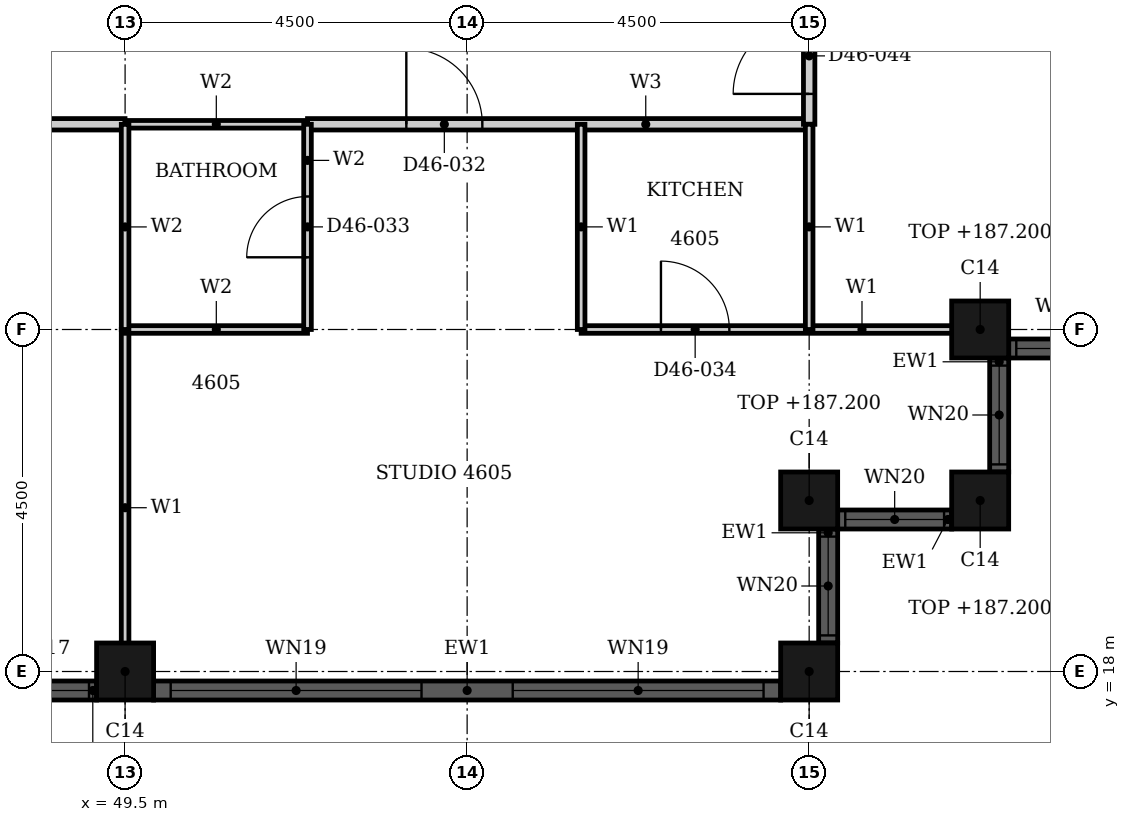
"""IFC4 building model, lengths in metres.
Left out: names, types, materials, properties, quantities, classifications, styles, units other than length and angle.
Written with IfcOpenShell. Run it as: python <this file> out.ifc"""

import sys

from ifc_helpers import new_model, si_unit, direction, frame, frame_2d, origin, origin_2d, place, context, subcontext, project, spatial, rectangle, hollow_rectangle, extrude, element, fill, save


model = new_model("IFC4")
c1 = context("Model", 3, precision=1e-05, world=origin(), true_north=direction((0.0, 1.0)))
c2 = subcontext(c1, "Body", "Model", "MODEL_VIEW")
j1 = project(units=[si_unit("LENGTHUNIT", "METRE"), si_unit("PLANEANGLEUNIT", "RADIAN")], contexts=[c1])
p1 = place(None, origin())
s1 = spatial("IfcSite", under=j1, at=p1, CompositionType="ELEMENT")
p2 = place(p1, origin())
s2 = spatial("IfcBuilding", under=s1, at=p2, CompositionType="ELEMENT")
p3 = place(p2, frame((0.0, 0.0, 183.9)))
s3 = spatial("IfcBuildingStorey", under=s2, at=p3, CompositionType="ELEMENT", Elevation=183.9)
p4 = place(p3, frame((49.5, 18.0, 0.0), z_axis=(0.0, 0.0, 1.0), x_axis=(1.0, 0.0, 0.0)))
e1 = element("IfcColumn", 1, at=p4, inside=s3, PredefinedType="COLUMN", context=c2, shape_type="SweptSolid", body=[
    extrude(hollow_rectangle(XDim=0.75, YDim=0.75, WallThickness=0.024, at=origin_2d()), origin(), (0.0, 0.0, 1.0), 3.7),
])
for number, where, z_axis, x_axis in (
    (2, (58.5, 18.0, 0.0), (0.0, 0.0, 1.0), (1.0, 0.0, 0.0)),
    (3, (58.5, 20.25, 0.0), (0.0, 0.0, 1.0), (1.0, 0.0, 0.0)),
    (4, (60.75, 20.25, 0.0), (0.0, 0.0, 1.0), (1.0, 0.0, 0.0)),
    (5, (60.75, 22.5, 0.0), (0.0, 0.0, 1.0), (1.0, 0.0, 0.0)),
):
    element("IfcColumn", number, at=place(p3, frame(where, z_axis=z_axis, x_axis=x_axis)), inside=s3, PredefinedType="COLUMN", context=c2, shape_type="SweptSolid", body=[
        extrude(hollow_rectangle(XDim=0.75, YDim=0.75, WallThickness=0.024, at=origin_2d()), origin(), (0.0, 0.0, 1.0), 3.3),
    ])
p5 = place(p3, frame((47.625, 17.75, 0.0), z_axis=(0.0, 0.0, 1.0), x_axis=(1.0, 0.0, 0.0)))
e6 = element("IfcWall", 6, at=p5, inside=s3, PredefinedType="SOLIDWALL", context=c2, shape_type="SweptSolid", body=[
    extrude(rectangle(XDim=1.5, YDim=0.25, at=frame_2d((0.75, 0.0))), origin(), (0.0, 0.0, 1.0), 3.7),
])
p6 = place(p5, frame((0.1, 0.0, 0.9)))
e7 = element("IfcOpeningElement", 7, at=p6, cuts=e6, PredefinedType="OPENING", context=c2, shape_type="SweptSolid", body=[
    extrude(rectangle(XDim=1.3, YDim=1.95, at=frame_2d((0.65, 0.975))), frame((0.0, 0.135, 0.0), z_axis=(0.0, -1.0, 0.0), x_axis=(1.0, 0.0, 0.0)), (0.0, 0.0, 1.0), 0.27),
])
p7 = place(p3, frame((49.875, 17.75, 0.0), z_axis=(0.0, 0.0, 1.0), x_axis=(1.0, 0.0, 0.0)))
e8 = element("IfcWall", 8, at=p7, inside=s3, PredefinedType="SOLIDWALL", context=c2, shape_type="SweptSolid", body=[
    extrude(rectangle(XDim=8.25, YDim=0.25, at=frame_2d((4.125, 0.0))), origin(), (0.0, 0.0, 1.0), 3.7),
])
p8 = place(p7, frame((0.225, 0.0, 0.45)))
e9 = element("IfcOpeningElement", 9, at=p8, cuts=e8, PredefinedType="OPENING", context=c2, shape_type="SweptSolid", body=[
    extrude(rectangle(XDim=3.3, YDim=2.2, at=frame_2d((1.65, 1.1))), frame((0.0, 0.135, 0.0), z_axis=(0.0, -1.0, 0.0), x_axis=(1.0, 0.0, 0.0)), (0.0, 0.0, 1.0), 0.27),
])
p9 = place(p7, frame((4.725, 0.0, 0.45)))
e10 = element("IfcOpeningElement", 10, at=p9, cuts=e8, PredefinedType="OPENING", context=c2, shape_type="SweptSolid", body=[
    extrude(rectangle(XDim=3.3, YDim=2.2, at=frame_2d((1.65, 1.1))), frame((0.0, 0.135, 0.0), z_axis=(0.0, -1.0, 0.0), x_axis=(1.0, 0.0, 0.0)), (0.0, 0.0, 1.0), 0.27),
])
p10 = place(p3, frame((58.75, 18.375, 0.0), z_axis=(0.0, 0.0, 1.0), x_axis=(0.0, 1.0, 0.0)))
e11 = element("IfcWall", 11, at=p10, inside=s3, PredefinedType="SOLIDWALL", context=c2, shape_type="SweptSolid", body=[
    extrude(rectangle(XDim=1.5, YDim=0.25, at=frame_2d((0.75, 0.0))), origin(), (0.0, 0.0, 1.0), 3.7),
])
p11 = place(p10, frame((0.1, 0.0, 0.9)))
e12 = element("IfcOpeningElement", 12, at=p11, cuts=e11, PredefinedType="OPENING", context=c2, shape_type="SweptSolid", body=[
    extrude(rectangle(XDim=1.3, YDim=1.75, at=frame_2d((0.65, 0.875))), frame((0.0, 0.135, 0.0), z_axis=(0.0, -1.0, 0.0), x_axis=(1.0, 0.0, 0.0)), (0.0, 0.0, 1.0), 0.27),
])
p12 = place(p3, frame((58.875, 20.0, 0.0), z_axis=(0.0, 0.0, 1.0), x_axis=(1.0, 0.0, 0.0)))
e13 = element("IfcWall", 13, at=p12, inside=s3, PredefinedType="SOLIDWALL", context=c2, shape_type="SweptSolid", body=[
    extrude(rectangle(XDim=1.5, YDim=0.25, at=frame_2d((0.75, 0.0))), origin(), (0.0, 0.0, 1.0), 3.7),
])
p13 = place(p12, frame((0.1, 0.0, 0.9)))
e14 = element("IfcOpeningElement", 14, at=p13, cuts=e13, PredefinedType="OPENING", context=c2, shape_type="SweptSolid", body=[
    extrude(rectangle(XDim=1.3, YDim=1.75, at=frame_2d((0.65, 0.875))), frame((0.0, 0.135, 0.0), z_axis=(0.0, -1.0, 0.0), x_axis=(1.0, 0.0, 0.0)), (0.0, 0.0, 1.0), 0.27),
])
p14 = place(p3, frame((61.0, 20.625, 0.0), z_axis=(0.0, 0.0, 1.0), x_axis=(0.0, 1.0, 0.0)))
e15 = element("IfcWall", 15, at=p14, inside=s3, PredefinedType="SOLIDWALL", context=c2, shape_type="SweptSolid", body=[
    extrude(rectangle(XDim=1.5, YDim=0.25, at=frame_2d((0.75, 0.0))), origin(), (0.0, 0.0, 1.0), 3.7),
])
p15 = place(p14, frame((0.1, 0.0, 0.9)))
e16 = element("IfcOpeningElement", 16, at=p15, cuts=e15, PredefinedType="OPENING", context=c2, shape_type="SweptSolid", body=[
    extrude(rectangle(XDim=1.3, YDim=1.75, at=frame_2d((0.65, 0.875))), frame((0.0, 0.135, 0.0), z_axis=(0.0, -1.0, 0.0), x_axis=(1.0, 0.0, 0.0)), (0.0, 0.0, 1.0), 0.27),
])
p16 = place(p3, frame((61.125, 22.25, 0.0), z_axis=(0.0, 0.0, 1.0), x_axis=(1.0, 0.0, 0.0)))
e17 = element("IfcWall", 17, at=p16, inside=s3, PredefinedType="SOLIDWALL", context=c2, shape_type="SweptSolid", body=[
    extrude(rectangle(XDim=1.5, YDim=0.25, at=frame_2d((0.75, 0.0))), origin(), (0.0, 0.0, 1.0), 3.7),
])
p17 = place(p16, frame((0.1, 0.0, 0.9)))
e18 = element("IfcOpeningElement", 18, at=p17, cuts=e17, PredefinedType="OPENING", context=c2, shape_type="SweptSolid", body=[
    extrude(rectangle(XDim=1.3, YDim=1.75, at=frame_2d((0.65, 0.875))), frame((0.0, 0.135, 0.0), z_axis=(0.0, -1.0, 0.0), x_axis=(1.0, 0.0, 0.0)), (0.0, 0.0, 1.0), 0.27),
])
p18 = place(p3, frame((51.9, 25.2, 0.0), z_axis=(0.0, 0.0, 1.0), x_axis=(1.0, 0.0, 0.0)))
e19 = element("IfcWall", 19, at=p18, inside=s3, PredefinedType="PARTITIONING", context=c2, shape_type="SweptSolid", body=[
    extrude(rectangle(XDim=6.6, YDim=0.15, at=frame_2d((3.3, 0.0))), origin(), (0.0, 0.0, 1.0), 3.3),
])
p19 = place(p18, frame((1.3, 0.0, 0.0)))
e20 = element("IfcOpeningElement", 20, at=p19, cuts=e19, PredefinedType="OPENING", context=c2, shape_type="SweptSolid", body=[
    extrude(rectangle(XDim=1.0, YDim=2.2, at=frame_2d((0.5, 1.1))), frame((0.0, 0.085, 0.0), z_axis=(0.0, -1.0, 0.0), x_axis=(1.0, 0.0, 0.0)), (0.0, 0.0, 1.0), 0.17),
])
p20 = place(p3, frame((46.801, 25.2, 0.0), z_axis=(0.0, 0.0, 1.0), x_axis=(1.0, 0.0, 0.0)))
e21 = element("IfcWall", 21, at=p20, inside=s3, PredefinedType="PARTITIONING", context=c2, shape_type="SweptSolid", body=[
    extrude(rectangle(XDim=2.698, YDim=0.15, at=frame_2d((1.349, 0.0))), origin(), (0.0, 0.0, 1.0), 3.3),
])
p21 = place(p3, frame((58.5, 25.2, 0.0), z_axis=(0.0, 0.0, 1.0), x_axis=(0.0, 1.0, 0.0)))
e22 = element("IfcWall", 22, at=p21, inside=s3, PredefinedType="PARTITIONING", context=c2, shape_type="SweptSolid", body=[
    extrude(rectangle(XDim=1.8, YDim=0.15, at=frame_2d((0.9, 0.0))), origin(), (0.0, 0.0, 1.0), 3.3),
])
p22 = place(p21, frame((0.4, 0.0, 0.0)))
e23 = element("IfcOpeningElement", 23, at=p22, cuts=e22, PredefinedType="OPENING", context=c2, shape_type="SweptSolid", body=[
    extrude(rectangle(XDim=1.0, YDim=2.1, at=frame_2d((0.5, 1.05))), frame((0.0, 0.085, 0.0), z_axis=(0.0, -1.0, 0.0), x_axis=(1.0, 0.0, 0.0)), (0.0, 0.0, 1.0), 0.17),
])
p23 = place(p3, frame((55.5, 22.5, 0.0), z_axis=(0.0, 0.0, 1.0), x_axis=(1.0, 0.0, 0.0)))
e24 = element("IfcWall", 24, at=p23, inside=s3, PredefinedType="PARTITIONING", context=c2, shape_type="SweptSolid", body=[
    extrude(rectangle(XDim=5.44, YDim=0.1, at=frame_2d((2.72, 0.0))), origin(), (0.0, 0.0, 1.0), 2.58),
])
p24 = place(p23, frame((1.05, 0.0, 0.0)))
e25 = element("IfcOpeningElement", 25, at=p24, cuts=e24, PredefinedType="OPENING", context=c2, shape_type="SweptSolid", body=[
    extrude(rectangle(XDim=0.9, YDim=2.1, at=frame_2d((0.45, 1.05))), frame((0.0, 0.06, 0.0), z_axis=(0.0, -1.0, 0.0), x_axis=(1.0, 0.0, 0.0)), (0.0, 0.0, 1.0), 0.12),
])
p25 = place(p3, frame((49.5, 17.81, 0.0), z_axis=(0.0, 0.0, 1.0), x_axis=(0.0, 1.0, 0.0)))
e26 = element("IfcWall", 26, at=p25, inside=s3, PredefinedType="PARTITIONING", context=c2, shape_type="SweptSolid", body=[
    extrude(rectangle(XDim=4.69, YDim=0.1, at=frame_2d((2.345, 0.0))), origin(), (0.0, 0.0, 1.0), 2.368),
])
for number, where, z_axis, x_axis in (
    (27, (55.5, 22.5, 0.0), (0.0, 0.0, 1.0), (0.0, 1.0, 0.0)),
    (28, (58.5, 22.5, 0.0), (0.0, 0.0, 1.0), (0.0, 1.0, 0.0)),
):
    element("IfcWall", number, at=place(p3, frame(where, z_axis=z_axis, x_axis=x_axis)), inside=s3, PredefinedType="PARTITIONING", context=c2, shape_type="SweptSolid", body=[
        extrude(rectangle(XDim=2.7, YDim=0.1, at=frame_2d((1.35, 0.0))), origin(), (0.0, 0.0, 1.0), 3.3),
    ])
p26 = place(p3, frame((49.5, 22.5, 0.0), z_axis=(0.0, 0.0, 1.0), x_axis=(1.0, 0.0, 0.0)))
e29 = element("IfcWall", 29, at=p26, inside=s3, PredefinedType="PARTITIONING", context=c2, shape_type="SweptSolid", body=[
    extrude(rectangle(XDim=2.4, YDim=0.1, at=frame_2d((1.2, 0.0))), origin(), (0.0, 0.0, 1.0), 2.58),
])
p27 = place(p3, frame((49.5, 25.2, 0.0), z_axis=(0.0, 0.0, 1.0), x_axis=(1.0, 0.0, 0.0)))
e30 = element("IfcWall", 30, at=p27, inside=s3, PredefinedType="PARTITIONING", context=c2, shape_type="SweptSolid", body=[
    extrude(rectangle(XDim=2.4, YDim=0.1, at=frame_2d((1.2, 0.0))), origin(), (0.0, 0.0, 1.0), 3.3),
])
p28 = place(p3, frame((49.5, 22.5, 0.0), z_axis=(0.0, 0.0, 1.0), x_axis=(0.0, 1.0, 0.0)))
e31 = element("IfcWall", 31, at=p28, inside=s3, PredefinedType="PARTITIONING", context=c2, shape_type="SweptSolid", body=[
    extrude(rectangle(XDim=2.699, YDim=0.1, at=frame_2d((1.35, 0.0))), origin(), (0.0, 0.0, 1.0), 2.368),
])
p29 = place(p3, frame((51.9, 22.5, 0.0), z_axis=(0.0, 0.0, 1.0), x_axis=(0.0, 1.0, 0.0)))
e32 = element("IfcWall", 32, at=p29, inside=s3, PredefinedType="PARTITIONING", context=c2, shape_type="SweptSolid", body=[
    extrude(rectangle(XDim=2.7, YDim=0.1, at=frame_2d((1.35, 0.0))), origin(), (0.0, 0.0, 1.0), 3.3),
])
p30 = place(p29, frame((0.95, 0.0, 0.0)))
e33 = element("IfcOpeningElement", 33, at=p30, cuts=e32, PredefinedType="OPENING", context=c2, shape_type="SweptSolid", body=[
    extrude(rectangle(XDim=0.8, YDim=2.1, at=frame_2d((0.4, 1.05))), frame((0.0, 0.06, 0.0), z_axis=(0.0, -1.0, 0.0), x_axis=(1.0, 0.0, 0.0)), (0.0, 0.0, 1.0), 0.12),
])
p31 = place(p6, origin())
e34 = element("IfcWindow", 34, at=p31, inside=s3, PartitioningType="SINGLE_PANEL", PredefinedType="WINDOW", context=c2, shape_type="SweptSolid", body=[
    extrude(rectangle(XDim=1.3, YDim=1.95, at=frame_2d((0.65, 0.975))), frame((0.0, 0.03, 0.0), z_axis=(0.0, -1.0, 0.0), x_axis=(1.0, 0.0, 0.0)), (0.0, 0.0, 1.0), 0.06),
])
fill(e7, e34)
p32 = place(p8, origin())
e35 = element("IfcWindow", 35, at=p32, inside=s3, PartitioningType="SINGLE_PANEL", PredefinedType="WINDOW", context=c2, shape_type="SweptSolid", body=[
    extrude(rectangle(XDim=3.3, YDim=2.2, at=frame_2d((1.65, 1.1))), frame((0.0, 0.03, 0.0), z_axis=(0.0, -1.0, 0.0), x_axis=(1.0, 0.0, 0.0)), (0.0, 0.0, 1.0), 0.06),
])
fill(e9, e35)
p33 = place(p9, origin())
e36 = element("IfcWindow", 36, at=p33, inside=s3, PartitioningType="SINGLE_PANEL", PredefinedType="WINDOW", context=c2, shape_type="SweptSolid", body=[
    extrude(rectangle(XDim=3.3, YDim=2.2, at=frame_2d((1.65, 1.1))), frame((0.0, 0.03, 0.0), z_axis=(0.0, -1.0, 0.0), x_axis=(1.0, 0.0, 0.0)), (0.0, 0.0, 1.0), 0.06),
])
fill(e10, e36)
p34 = place(p11, origin())
e37 = element("IfcWindow", 37, at=p34, inside=s3, PartitioningType="SINGLE_PANEL", PredefinedType="WINDOW", context=c2, shape_type="SweptSolid", body=[
    extrude(rectangle(XDim=1.3, YDim=1.75, at=frame_2d((0.65, 0.875))), frame((0.0, 0.03, 0.0), z_axis=(0.0, -1.0, 0.0), x_axis=(1.0, 0.0, 0.0)), (0.0, 0.0, 1.0), 0.06),
])
fill(e12, e37)
p35 = place(p13, origin())
e38 = element("IfcWindow", 38, at=p35, inside=s3, PartitioningType="SINGLE_PANEL", PredefinedType="WINDOW", context=c2, shape_type="SweptSolid", body=[
    extrude(rectangle(XDim=1.3, YDim=1.75, at=frame_2d((0.65, 0.875))), frame((0.0, 0.03, 0.0), z_axis=(0.0, -1.0, 0.0), x_axis=(1.0, 0.0, 0.0)), (0.0, 0.0, 1.0), 0.06),
])
fill(e14, e38)
p36 = place(p15, origin())
e39 = element("IfcWindow", 39, at=p36, inside=s3, PartitioningType="SINGLE_PANEL", PredefinedType="WINDOW", context=c2, shape_type="SweptSolid", body=[
    extrude(rectangle(XDim=1.3, YDim=1.75, at=frame_2d((0.65, 0.875))), frame((0.0, 0.03, 0.0), z_axis=(0.0, -1.0, 0.0), x_axis=(1.0, 0.0, 0.0)), (0.0, 0.0, 1.0), 0.06),
])
fill(e16, e39)
p37 = place(p17, origin())
e40 = element("IfcWindow", 40, at=p37, inside=s3, PartitioningType="SINGLE_PANEL", PredefinedType="WINDOW", context=c2, shape_type="SweptSolid", body=[
    extrude(rectangle(XDim=1.3, YDim=1.75, at=frame_2d((0.65, 0.875))), frame((0.0, 0.03, 0.0), z_axis=(0.0, -1.0, 0.0), x_axis=(1.0, 0.0, 0.0)), (0.0, 0.0, 1.0), 0.06),
])
fill(e18, e40)
p38 = place(p19, origin())
e41 = element("IfcDoor", 41, at=p38, inside=s3, OperationType="SINGLE_SWING_RIGHT", PredefinedType="DOOR", context=c2, shape_type="SweptSolid", body=[
    extrude(rectangle(XDim=1.0, YDim=2.2, at=frame_2d((0.5, 1.1))), frame((0.0, 0.025, 0.0), z_axis=(0.0, -1.0, 0.0), x_axis=(1.0, 0.0, 0.0)), (0.0, 0.0, 1.0), 0.05),
])
fill(e20, e41)
p39 = place(p30, origin())
e42 = element("IfcDoor", 42, at=p39, inside=s3, OperationType="SINGLE_SWING_RIGHT", PredefinedType="DOOR", context=c2, shape_type="SweptSolid", body=[
    extrude(rectangle(XDim=0.8, YDim=2.1, at=frame_2d((0.4, 1.05))), frame((0.0, 0.025, 0.0), z_axis=(0.0, -1.0, 0.0), x_axis=(1.0, 0.0, 0.0)), (0.0, 0.0, 1.0), 0.05),
])
fill(e33, e42)
p40 = place(p24, origin())
e43 = element("IfcDoor", 43, at=p40, inside=s3, OperationType="SINGLE_SWING_LEFT", PredefinedType="DOOR", context=c2, shape_type="SweptSolid", body=[
    extrude(rectangle(XDim=0.9, YDim=2.1, at=frame_2d((0.45, 1.05))), frame((0.0, 0.025, 0.0), z_axis=(0.0, -1.0, 0.0), x_axis=(1.0, 0.0, 0.0)), (0.0, 0.0, 1.0), 0.05),
])
fill(e25, e43)
p41 = place(p22, origin())
e44 = element("IfcDoor", 44, at=p41, inside=s3, OperationType="SINGLE_SWING_LEFT", PredefinedType="DOOR", context=c2, shape_type="SweptSolid", body=[
    extrude(rectangle(XDim=1.0, YDim=2.1, at=frame_2d((0.5, 1.05))), frame((0.0, 0.025, 0.0), z_axis=(0.0, -1.0, 0.0), x_axis=(1.0, 0.0, 0.0)), (0.0, 0.0, 1.0), 0.05),
])
fill(e23, e44)
save(model, sys.argv[1])
